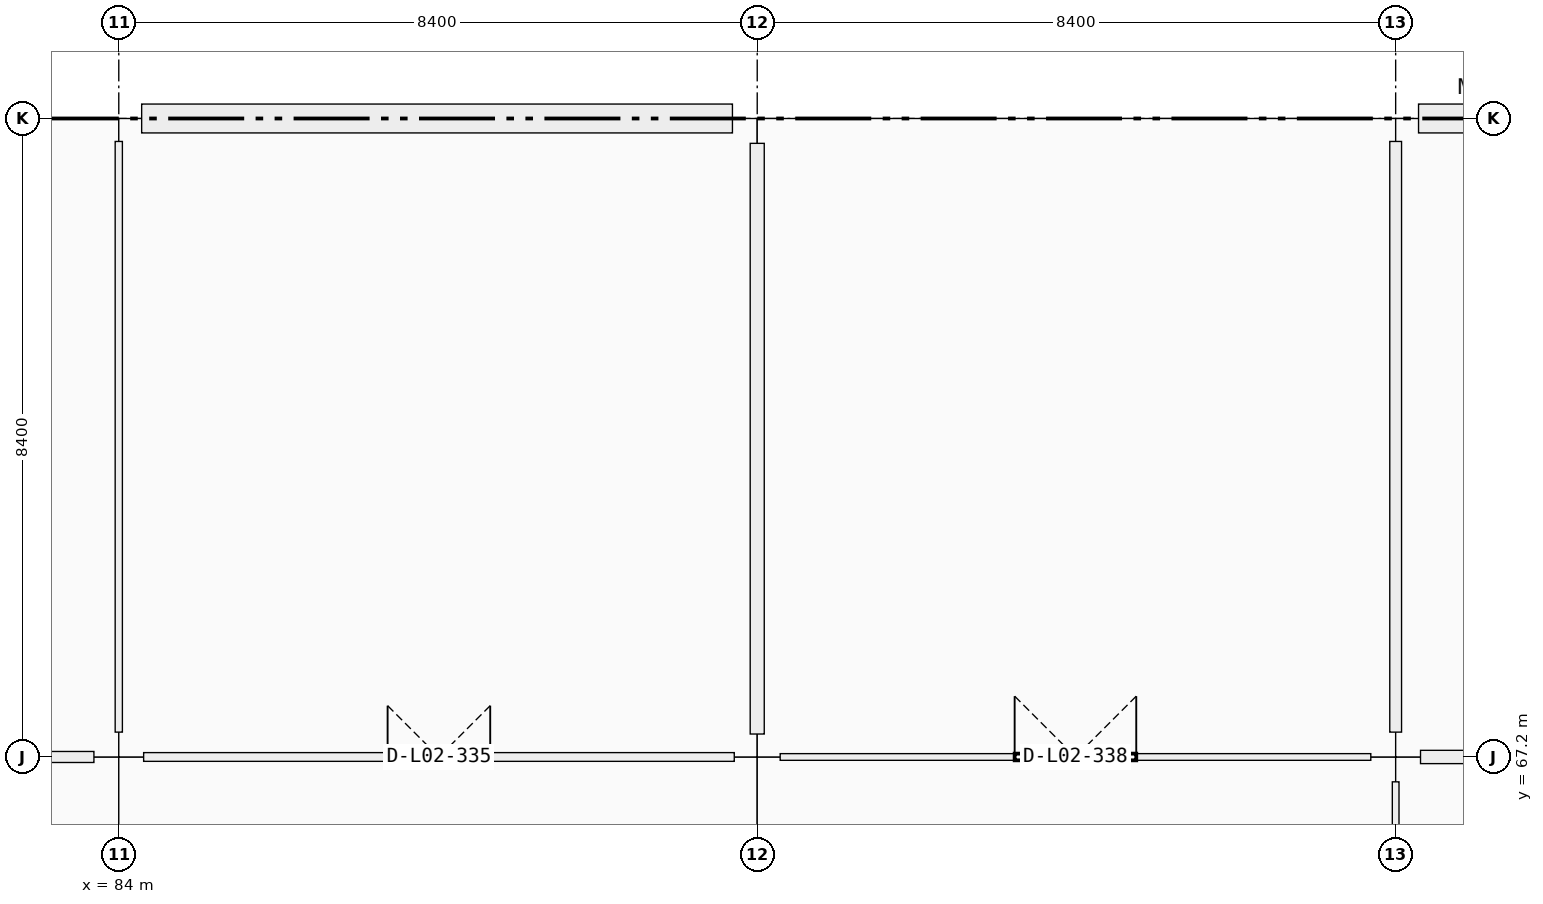
"""IFC4 building model, lengths in metres.
Left out: names, types, materials, properties, quantities, classifications, styles, units other than length and angle.
Written with IfcOpenShell. Run it as: python <this file> out.ifc"""

import sys

from ifc_helpers import new_model, si_unit, direction, frame, frame_2d, origin, origin_2d, place, context, subcontext, project, spatial, rectangle, extrude, element, fill, save


model = new_model("IFC4")
c1 = context("Model", 3, precision=1e-05, world=origin(), true_north=direction((0.0, 1.0)))
c2 = subcontext(c1, "Body", "Model", "MODEL_VIEW")
j1 = project(units=[si_unit("LENGTHUNIT", "METRE"), si_unit("PLANEANGLEUNIT", "RADIAN")], contexts=[c1])
p1 = place(None, origin())
s1 = spatial("IfcSite", under=j1, at=p1, CompositionType="ELEMENT")
p2 = place(p1, origin())
s2 = spatial("IfcBuilding", under=s1, at=p2, CompositionType="ELEMENT")
p3 = place(p2, frame((0.0, 0.0, 10.26)))
s3 = spatial("IfcBuildingStorey", under=s2, at=p3, CompositionType="ELEMENT", Elevation=10.26)
p4 = place(p3, frame((84.0, 67.2, 0.0), z_axis=(0.0, 0.0, 1.0), x_axis=(1.0, 0.0, 0.0)))
e1 = element("IfcColumn", 1, at=p4, inside=s3, PredefinedType="COLUMN", context=c2, shape_type="SweptSolid", body=[
    extrude(rectangle(XDim=0.65, YDim=0.65, at=origin_2d()), origin(), (0.0, 0.0, 1.0), 4.5),
])
for number, where, z_axis, x_axis in (
    (2, (84.0, 75.6, 0.0), (0.0, 0.0, 1.0), (1.0, 0.0, 0.0)),
    (3, (92.4, 67.2, 0.0), (0.0, 0.0, 1.0), (1.0, 0.0, 0.0)),
):
    element("IfcColumn", number, at=place(p3, frame(where, z_axis=z_axis, x_axis=x_axis)), inside=s3, PredefinedType="COLUMN", context=c2, shape_type="SweptSolid", body=[
        extrude(rectangle(XDim=0.6, YDim=0.6, at=origin_2d()), origin(), (0.0, 0.0, 1.0), 4.5),
    ])
for number, where, z_axis, x_axis in (
    (4, (92.4, 75.6, 0.0), (0.0, 0.0, 1.0), (1.0, 0.0, 0.0)),
    (5, (100.8, 67.2, 0.0), (0.0, 0.0, 1.0), (1.0, 0.0, 0.0)),
):
    element("IfcColumn", number, at=place(p3, frame(where, z_axis=z_axis, x_axis=x_axis)), inside=s3, PredefinedType="COLUMN", context=c2, shape_type="SweptSolid", body=[
        extrude(rectangle(XDim=0.65, YDim=0.65, at=origin_2d()), origin(), (0.0, 0.0, 1.0), 4.5),
    ])
p5 = place(p3, frame((100.8, 75.6, 0.0), z_axis=(0.0, 0.0, 1.0), x_axis=(1.0, 0.0, 0.0)))
e6 = element("IfcColumn", 6, at=p5, inside=s3, PredefinedType="COLUMN", context=c2, shape_type="SweptSolid", body=[
    extrude(rectangle(XDim=0.6, YDim=0.6, at=origin_2d()), origin(), (0.0, 0.0, 1.0), 4.5),
])
p6 = place(p3, frame((84.301, 75.6, 0.0), z_axis=(0.0, 0.0, 1.0), x_axis=(1.0, 0.0, 0.0)))
e7 = element("IfcWall", 7, at=p6, inside=s3, PredefinedType="SOLIDWALL", context=c2, shape_type="SweptSolid", body=[
    extrude(rectangle(XDim=7.773, YDim=0.38, at=frame_2d((3.886, 0.0))), origin(), (0.0, 0.0, 1.0), 3.54),
])
p7 = place(p6, frame((3.136, 0.0, 1.55)))
e8 = element("IfcOpeningElement", 8, at=p7, cuts=e7, PredefinedType="OPENING", context=c2, shape_type="SweptSolid", body=[
    extrude(rectangle(XDim=1.5, YDim=1.2, at=frame_2d((0.75, 0.6))), frame((0.0, 0.19, 0.0), z_axis=(0.0, -1.0, 0.0), x_axis=(1.0, 0.0, 0.0)), (0.0, 0.0, 1.0), 0.38),
])
p8 = place(p3, frame((101.101, 75.6, 0.0), z_axis=(0.0, 0.0, 1.0), x_axis=(1.0, 0.0, 0.0)))
e9 = element("IfcWall", 9, at=p8, inside=s3, PredefinedType="SOLIDWALL", context=c2, shape_type="SweptSolid", body=[
    extrude(rectangle(XDim=7.773, YDim=0.38, at=frame_2d((3.886, 0.0))), origin(), (0.0, 0.0, 1.0), 3.54),
])
p9 = place(p3, frame((75.902, 67.2, 0.0), z_axis=(0.0, 0.0, 1.0), x_axis=(1.0, 0.0, 0.0)))
e10 = element("IfcWall", 10, at=p9, inside=s3, PredefinedType="PARTITIONING", context=c2, shape_type="SweptSolid", body=[
    extrude(rectangle(XDim=7.771, YDim=0.145, at=frame_2d((3.885, 0.0))), origin(), (0.0, 0.0, 1.0), 3.37),
])
p10 = place(p9, frame((3.16, 0.0, 0.0)))
e11 = element("IfcOpeningElement", 11, at=p10, cuts=e10, PredefinedType="OPENING", context=c2, shape_type="SweptSolid", body=[
    extrude(rectangle(XDim=1.45, YDim=2.2, at=frame_2d((0.725, 1.1))), frame((0.0, 0.073, 0.0), z_axis=(0.0, -1.0, 0.0), x_axis=(1.0, 0.0, 0.0)), (0.0, 0.0, 1.0), 0.145),
])
p11 = place(p3, frame((84.327, 67.2, 0.0), z_axis=(0.0, 0.0, 1.0), x_axis=(1.0, 0.0, 0.0)))
e12 = element("IfcWall", 12, at=p11, inside=s3, PredefinedType="PARTITIONING", context=c2, shape_type="SweptSolid", body=[
    extrude(rectangle(XDim=7.771, YDim=0.115, at=frame_2d((3.885, 0.0))), origin(), (0.0, 0.0, 1.0), 3.37),
])
p12 = place(p11, frame((3.21, 0.0, 0.0)))
e13 = element("IfcOpeningElement", 13, at=p12, cuts=e12, PredefinedType="OPENING", context=c2, shape_type="SweptSolid", body=[
    extrude(rectangle(XDim=1.35, YDim=2.2, at=frame_2d((0.675, 1.1))), frame((0.0, 0.058, 0.0), z_axis=(0.0, -1.0, 0.0), x_axis=(1.0, 0.0, 0.0)), (0.0, 0.0, 1.0), 0.115),
])
p13 = place(p3, frame((92.702, 67.2, 0.0), z_axis=(0.0, 0.0, 1.0), x_axis=(1.0, 0.0, 0.0)))
e14 = element("IfcWall", 14, at=p13, inside=s3, PredefinedType="PARTITIONING", context=c2, shape_type="SweptSolid", body=[
    extrude(rectangle(XDim=7.771, YDim=0.088, at=frame_2d((3.885, 0.0))), origin(), (0.0, 0.0, 1.0), 3.37),
])
p14 = place(p13, frame((3.085, 0.0, 0.0)))
e15 = element("IfcOpeningElement", 15, at=p14, cuts=e14, PredefinedType="OPENING", context=c2, shape_type="SweptSolid", body=[
    extrude(rectangle(XDim=1.6, YDim=2.3, at=frame_2d((0.8, 1.15))), frame((0.0, 0.044, 0.0), z_axis=(0.0, -1.0, 0.0), x_axis=(1.0, 0.0, 0.0)), (0.0, 0.0, 1.0), 0.088),
])
p15 = place(p3, frame((101.127, 67.2, 0.0), z_axis=(0.0, 0.0, 1.0), x_axis=(1.0, 0.0, 0.0)))
e16 = element("IfcWall", 16, at=p15, inside=s3, PredefinedType="PARTITIONING", context=c2, shape_type="SweptSolid", body=[
    extrude(rectangle(XDim=7.771, YDim=0.175, at=frame_2d((3.885, 0.0))), origin(), (0.0, 0.0, 1.0), 3.37),
])
p16 = place(p15, frame((3.186, 0.0, 0.0)))
e17 = element("IfcOpeningElement", 17, at=p16, cuts=e16, PredefinedType="OPENING", context=c2, shape_type="SweptSolid", body=[
    extrude(rectangle(XDim=1.4, YDim=2.25, at=frame_2d((0.7, 1.125))), frame((0.0, 0.087, 0.0), z_axis=(0.0, -1.0, 0.0), x_axis=(1.0, 0.0, 0.0)), (0.0, 0.0, 1.0), 0.175),
])
p17 = place(p3, frame((84.0, 67.527, 0.0), z_axis=(0.0, 0.0, 1.0), x_axis=(0.0, 1.0, 0.0)))
e18 = element("IfcWall", 18, at=p17, inside=s3, PredefinedType="PARTITIONING", context=c2, shape_type="SweptSolid", body=[
    extrude(rectangle(XDim=7.771, YDim=0.095, at=frame_2d((3.885, 0.0))), origin(), (0.0, 0.0, 1.0), 3.37),
])
p18 = place(p17, frame((3.361, 0.0, 0.0)))
e19 = element("IfcOpeningElement", 19, at=p18, cuts=e18, PredefinedType="OPENING", context=c2, shape_type="SweptSolid", body=[
    extrude(rectangle(XDim=1.05, YDim=2.12, at=frame_2d((0.525, 1.06))), frame((0.0, 0.047, 0.0), z_axis=(0.0, -1.0, 0.0), x_axis=(1.0, 0.0, 0.0)), (0.0, 0.0, 1.0), 0.095),
])
p19 = place(p3, frame((92.4, 67.502, 0.0), z_axis=(0.0, 0.0, 1.0), x_axis=(0.0, 1.0, 0.0)))
e20 = element("IfcWall", 20, at=p19, inside=s3, PredefinedType="PARTITIONING", context=c2, shape_type="SweptSolid", body=[
    extrude(rectangle(XDim=7.771, YDim=0.185, at=frame_2d((3.885, 0.0))), origin(), (0.0, 0.0, 1.0), 3.37),
])
p20 = place(p19, frame((3.381, 0.0, 0.0)))
e21 = element("IfcOpeningElement", 21, at=p20, cuts=e20, PredefinedType="OPENING", context=c2, shape_type="SweptSolid", body=[
    extrude(rectangle(XDim=1.01, YDim=2.12, at=frame_2d((0.505, 1.06))), frame((0.0, 0.093, 0.0), z_axis=(0.0, -1.0, 0.0), x_axis=(1.0, 0.0, 0.0)), (0.0, 0.0, 1.0), 0.185),
])
p21 = place(p3, frame((100.8, 59.102, 0.0), z_axis=(0.0, 0.0, 1.0), x_axis=(0.0, 1.0, 0.0)))
e22 = element("IfcWall", 22, at=p21, inside=s3, PredefinedType="PARTITIONING", context=c2, shape_type="SweptSolid", body=[
    extrude(rectangle(XDim=7.771, YDim=0.088, at=frame_2d((3.885, 0.0))), origin(), (0.0, 0.0, 1.0), 3.37),
])
p22 = place(p21, frame((3.085, 0.0, 0.0)))
e23 = element("IfcOpeningElement", 23, at=p22, cuts=e22, PredefinedType="OPENING", context=c2, shape_type="SweptSolid", body=[
    extrude(rectangle(XDim=1.6, YDim=2.3, at=frame_2d((0.8, 1.15))), frame((0.0, 0.044, 0.0), z_axis=(0.0, -1.0, 0.0), x_axis=(1.0, 0.0, 0.0)), (0.0, 0.0, 1.0), 0.088),
])
p23 = place(p3, frame((100.8, 67.527, 0.0), z_axis=(0.0, 0.0, 1.0), x_axis=(0.0, 1.0, 0.0)))
e24 = element("IfcWall", 24, at=p23, inside=s3, PredefinedType="PARTITIONING", context=c2, shape_type="SweptSolid", body=[
    extrude(rectangle(XDim=7.771, YDim=0.155, at=frame_2d((3.885, 0.0))), origin(), (0.0, 0.0, 1.0), 3.37),
])
p24 = place(p23, frame((3.401, 0.0, 0.0)))
e25 = element("IfcOpeningElement", 25, at=p24, cuts=e24, PredefinedType="OPENING", context=c2, shape_type="SweptSolid", body=[
    extrude(rectangle(XDim=0.97, YDim=2.12, at=frame_2d((0.485, 1.06))), frame((0.0, 0.078, 0.0), z_axis=(0.0, -1.0, 0.0), x_axis=(1.0, 0.0, 0.0)), (0.0, 0.0, 1.0), 0.155),
])
p25 = place(p7, origin())
e26 = element("IfcWindow", 26, at=p25, inside=s3, PartitioningType="SINGLE_PANEL", PredefinedType="WINDOW", context=c2, shape_type="SweptSolid", body=[
    extrude(rectangle(XDim=1.5, YDim=1.2, at=frame_2d((0.75, 0.6))), frame((0.0, 0.03, 0.0), z_axis=(0.0, -1.0, 0.0), x_axis=(1.0, 0.0, 0.0)), (0.0, 0.0, 1.0), 0.06),
])
fill(e8, e26)
p26 = place(p12, origin())
e27 = element("IfcDoor", 27, at=p26, inside=s3, OperationType="DOUBLE_DOOR_SINGLE_SWING", PredefinedType="DOOR", context=c2, shape_type="SweptSolid", body=[
    extrude(rectangle(XDim=1.35, YDim=2.2, at=frame_2d((0.675, 1.1))), frame((0.0, 0.025, 0.0), z_axis=(0.0, -1.0, 0.0), x_axis=(1.0, 0.0, 0.0)), (0.0, 0.0, 1.0), 0.05),
])
fill(e13, e27)
p27 = place(p14, origin())
e28 = element("IfcDoor", 28, at=p27, inside=s3, OperationType="DOUBLE_DOOR_SINGLE_SWING", PredefinedType="DOOR", context=c2, shape_type="SweptSolid", body=[
    extrude(rectangle(XDim=1.6, YDim=2.3, at=frame_2d((0.8, 1.15))), frame((0.0, 0.025, 0.0), z_axis=(0.0, -1.0, 0.0), x_axis=(1.0, 0.0, 0.0)), (0.0, 0.0, 1.0), 0.05),
])
fill(e15, e28)
p28 = place(p18, origin())
e29 = element("IfcDoor", 29, at=p28, inside=s3, OperationType="SINGLE_SWING_RIGHT", PredefinedType="DOOR", context=c2, shape_type="SweptSolid", body=[
    extrude(rectangle(XDim=1.05, YDim=2.12, at=frame_2d((0.525, 1.06))), frame((0.0, 0.025, 0.0), z_axis=(0.0, -1.0, 0.0), x_axis=(1.0, 0.0, 0.0)), (0.0, 0.0, 1.0), 0.05),
])
fill(e19, e29)
p29 = place(p20, origin())
e30 = element("IfcDoor", 30, at=p29, inside=s3, OperationType="SINGLE_SWING_LEFT", PredefinedType="DOOR", context=c2, shape_type="SweptSolid", body=[
    extrude(rectangle(XDim=1.01, YDim=2.12, at=frame_2d((0.505, 1.06))), frame((0.0, 0.025, 0.0), z_axis=(0.0, -1.0, 0.0), x_axis=(1.0, 0.0, 0.0)), (0.0, 0.0, 1.0), 0.05),
])
fill(e21, e30)
p30 = place(p24, origin())
e31 = element("IfcDoor", 31, at=p30, inside=s3, OperationType="SINGLE_SWING_RIGHT", PredefinedType="DOOR", context=c2, shape_type="SweptSolid", body=[
    extrude(rectangle(XDim=0.97, YDim=2.12, at=frame_2d((0.485, 1.06))), frame((0.0, 0.025, 0.0), z_axis=(0.0, -1.0, 0.0), x_axis=(1.0, 0.0, 0.0)), (0.0, 0.0, 1.0), 0.05),
])
fill(e25, e31)
save(model, sys.argv[1])
